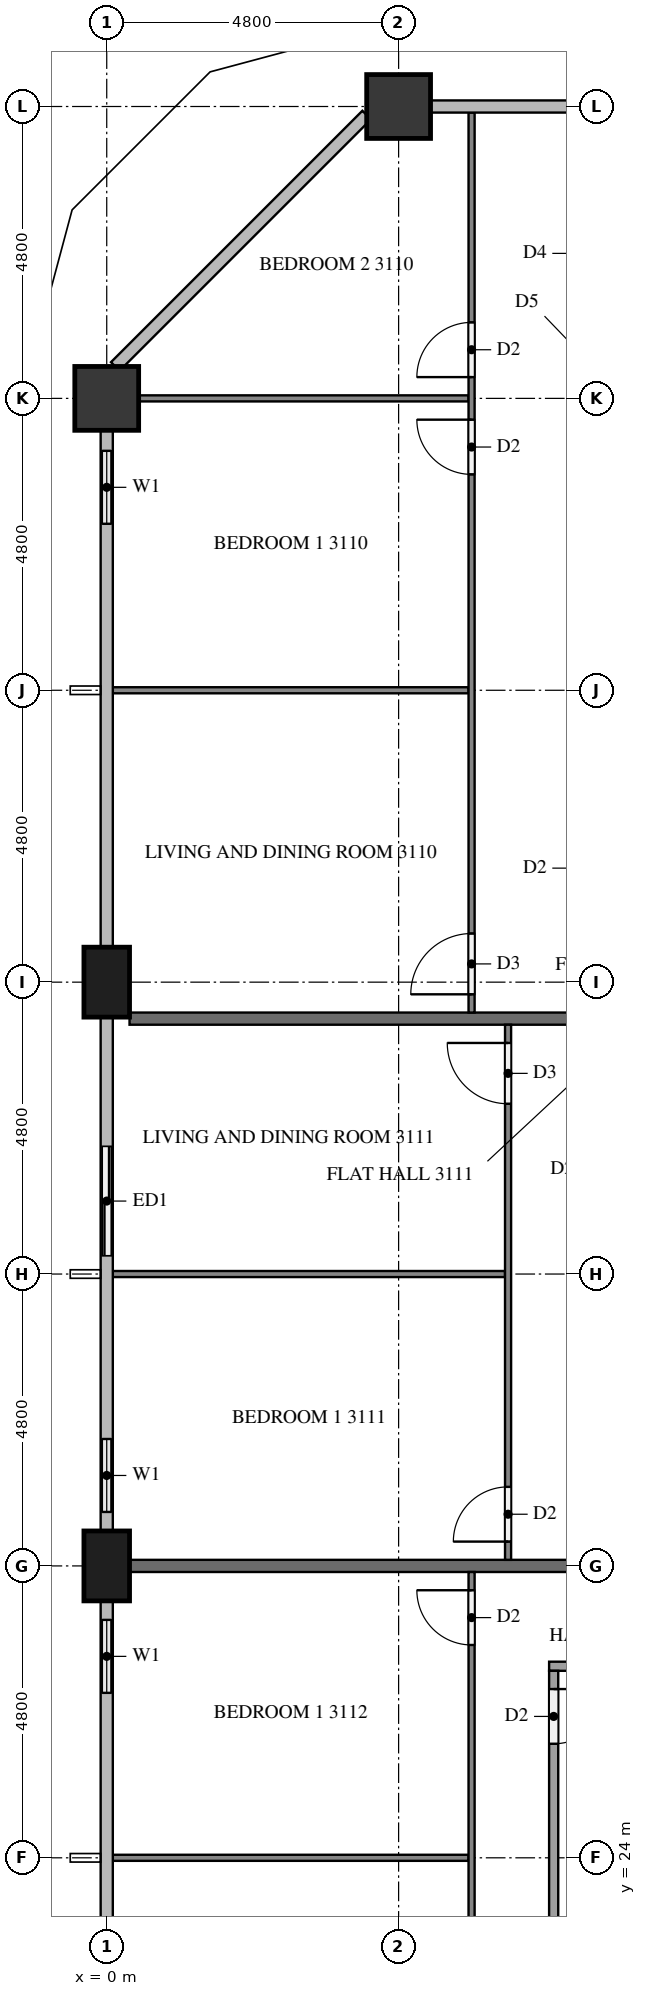
"""IFC4 building model, lengths in metres.
Left out: names, types, materials, properties, quantities, classifications, styles, units other than length and angle.
Written with IfcOpenShell. Run it as: python <this file> out.ifc"""

import sys

from ifc_helpers import new_model, si_unit, direction, frame, frame_2d, origin, origin_2d, place, context, subcontext, project, spatial, rectangle, extrude, element, fill, save


model = new_model("IFC4")
c1 = context("Model", 3, precision=1e-05, world=origin(), true_north=direction((0.0, 1.0)))
c2 = subcontext(c1, "Body", "Model", "MODEL_VIEW")
j1 = project(units=[si_unit("LENGTHUNIT", "METRE"), si_unit("PLANEANGLEUNIT", "RADIAN")], contexts=[c1])
p1 = place(None, origin())
s1 = spatial("IfcSite", under=j1, at=p1, CompositionType="ELEMENT")
p2 = place(p1, origin())
s2 = spatial("IfcBuilding", under=s1, at=p2, CompositionType="ELEMENT")
p3 = place(p2, frame((0.0, 0.0, 122.6)))
s3 = spatial("IfcBuildingStorey", under=s2, at=p3, CompositionType="ELEMENT", Elevation=122.6)
for number, where, z_axis, x_axis in (
    (1, (4.8, 52.8, 0.0), (0.0, 0.0, 1.0), (1.0, 0.0, 0.0)),
    (2, (0.0, 48.0, 0.0), (0.0, 0.0, 1.0), (1.0, 0.0, 0.0)),
):
    element("IfcColumn", number, at=place(p3, frame(where, z_axis=z_axis, x_axis=x_axis)), inside=s3, PredefinedType="COLUMN", context=c2, shape_type="SweptSolid", body=[
        extrude(rectangle(XDim=1.05, YDim=1.05, at=origin_2d()), origin(), (0.0, 0.0, 1.0), 3.2),
    ])
for number, where, z_axis, x_axis in (
    (3, (0.0, 38.4, 0.0), (0.0, 0.0, 1.0), (0.0, 1.0, 0.0)),
    (4, (0.0, 28.8, 0.0), (0.0, 0.0, 1.0), (0.0, 1.0, 0.0)),
):
    element("IfcColumn", number, at=place(p3, frame(where, z_axis=z_axis, x_axis=x_axis)), inside=s3, PredefinedType="COLUMN", context=c2, shape_type="SweptSolid", body=[
        extrude(rectangle(XDim=1.15, YDim=0.75, at=origin_2d()), origin(), (0.0, 0.0, 1.0), 3.2),
    ])
p4 = place(p3, frame((0.0, 47.475, 0.0), z_axis=(0.0, 0.0, 1.0), x_axis=(0.0, -1.0, 0.0)))
e5 = element("IfcWall", 5, at=p4, inside=s3, PredefinedType="SOLIDWALL", context=c2, shape_type="SweptSolid", body=[
    extrude(rectangle(XDim=1.875, YDim=0.15, at=frame_2d((0.938, 0.0))), origin(), (0.0, 0.0, 1.0), 3.2),
])
p5 = place(p4, frame((0.337, 0.0, 0.9)))
e6 = element("IfcOpeningElement", 6, at=p5, cuts=e5, PredefinedType="OPENING", context=c2, shape_type="SweptSolid", body=[
    extrude(rectangle(XDim=1.2, YDim=1.4, at=frame_2d((0.6, 0.7))), frame((0.0, 0.085, 0.0), z_axis=(0.0, -1.0, 0.0), x_axis=(1.0, 0.0, 0.0)), (0.0, 0.0, 1.0), 0.17),
])
p6 = place(p3, frame((0.0, 36.0, 0.0), z_axis=(0.0, 0.0, 1.0), x_axis=(0.0, -1.0, 0.0)))
e7 = element("IfcWall", 7, at=p6, inside=s3, PredefinedType="SOLIDWALL", context=c2, shape_type="SweptSolid", body=[
    extrude(rectangle(XDim=2.4, YDim=0.15, at=frame_2d((1.2, 0.0))), origin(), (0.0, 0.0, 1.0), 3.2),
])
p7 = place(p6, frame((0.3, 0.0, 0.0)))
e8 = element("IfcOpeningElement", 8, at=p7, cuts=e7, PredefinedType="OPENING", context=c2, shape_type="SweptSolid", body=[
    extrude(rectangle(XDim=1.8, YDim=2.4, at=frame_2d((0.9, 1.2))), frame((0.0, 0.085, 0.0), z_axis=(0.0, -1.0, 0.0), x_axis=(1.0, 0.0, 0.0)), (0.0, 0.0, 1.0), 0.17),
])
p8 = place(p3, frame((0.0, 31.2, 0.0), z_axis=(0.0, 0.0, 1.0), x_axis=(0.0, -1.0, 0.0)))
e9 = element("IfcWall", 9, at=p8, inside=s3, PredefinedType="SOLIDWALL", context=c2, shape_type="SweptSolid", body=[
    extrude(rectangle(XDim=1.825, YDim=0.15, at=frame_2d((0.913, 0.0))), origin(), (0.0, 0.0, 1.0), 3.2),
])
p9 = place(p8, frame((0.312, 0.0, 0.9)))
e10 = element("IfcOpeningElement", 10, at=p9, cuts=e9, PredefinedType="OPENING", context=c2, shape_type="SweptSolid", body=[
    extrude(rectangle(XDim=1.2, YDim=1.4, at=frame_2d((0.6, 0.7))), frame((0.0, 0.085, 0.0), z_axis=(0.0, -1.0, 0.0), x_axis=(1.0, 0.0, 0.0)), (0.0, 0.0, 1.0), 0.17),
])
p10 = place(p3, frame((0.0, 28.225, 0.0), z_axis=(0.0, 0.0, 1.0), x_axis=(0.0, -1.0, 0.0)))
e11 = element("IfcWall", 11, at=p10, inside=s3, PredefinedType="SOLIDWALL", context=c2, shape_type="SweptSolid", body=[
    extrude(rectangle(XDim=1.825, YDim=0.15, at=frame_2d((0.913, 0.0))), origin(), (0.0, 0.0, 1.0), 3.2),
])
p11 = place(p10, frame((0.312, 0.0, 0.9)))
e12 = element("IfcOpeningElement", 12, at=p11, cuts=e11, PredefinedType="OPENING", context=c2, shape_type="SweptSolid", body=[
    extrude(rectangle(XDim=1.2, YDim=1.4, at=frame_2d((0.6, 0.7))), frame((0.0, 0.085, 0.0), z_axis=(0.0, -1.0, 0.0), x_axis=(1.0, 0.0, 0.0)), (0.0, 0.0, 1.0), 0.17),
])
for number, where, z_axis, x_axis in (
    (13, (0.375, 37.8, 0.0), (0.0, 0.0, 1.0), (1.0, 0.0, 0.0)),
    (14, (0.375, 28.8, 0.0), (0.0, 0.0, 1.0), (1.0, 0.0, 0.0)),
):
    element("IfcWall", number, at=place(p3, frame(where, z_axis=z_axis, x_axis=x_axis)), inside=s3, PredefinedType="PARTITIONING", context=c2, shape_type="SweptSolid", body=[
        extrude(rectangle(XDim=9.525, YDim=0.2, at=frame_2d((4.762, 0.0))), origin(), (0.0, 0.0, 1.0), 3.2),
    ])
p12 = place(p3, frame((5.95, 43.2, 0.0), z_axis=(0.0, 0.0, 1.0), x_axis=(-1.0, 0.0, 0.0)))
e15 = element("IfcWall", 15, at=p12, inside=s3, PredefinedType="PARTITIONING", context=c2, shape_type="SweptSolid", body=[
    extrude(rectangle(XDim=5.85, YDim=0.1, at=frame_2d((2.925, 0.0))), origin(), (0.0, 0.0, 1.0), 3.2),
])
p13 = place(p3, frame((5.95, 48.0, 0.0), z_axis=(0.0, 0.0, 1.0), x_axis=(-1.0, 0.0, 0.0)))
e16 = element("IfcWall", 16, at=p13, inside=s3, PredefinedType="PARTITIONING", context=c2, shape_type="SweptSolid", body=[
    extrude(rectangle(XDim=5.425, YDim=0.1, at=frame_2d((2.712, 0.0))), origin(), (0.0, 0.0, 1.0), 3.2),
])
p14 = place(p3, frame((6.0, 37.9, 0.0), z_axis=(0.0, 0.0, 1.0), x_axis=(0.0, 1.0, 0.0)))
e17 = element("IfcWall", 17, at=p14, inside=s3, PredefinedType="PARTITIONING", context=c2, shape_type="SweptSolid", body=[
    extrude(rectangle(XDim=14.8, YDim=0.1, at=frame_2d((7.4, 0.0))), origin(), (0.0, 0.0, 1.0), 3.2),
])
p15 = place(p14, frame((0.3, 0.0, 0.0)))
e18 = element("IfcOpeningElement", 18, at=p15, cuts=e17, PredefinedType="OPENING", context=c2, shape_type="SweptSolid", body=[
    extrude(rectangle(XDim=1.0, YDim=2.1, at=frame_2d((0.5, 1.05))), frame((0.0, 0.06, 0.0), z_axis=(0.0, -1.0, 0.0), x_axis=(1.0, 0.0, 0.0)), (0.0, 0.0, 1.0), 0.12),
])
p16 = place(p14, frame((8.85, 0.0, 0.0)))
e19 = element("IfcOpeningElement", 19, at=p16, cuts=e17, PredefinedType="OPENING", context=c2, shape_type="SweptSolid", body=[
    extrude(rectangle(XDim=0.9, YDim=2.1, at=frame_2d((0.45, 1.05))), frame((0.0, 0.06, 0.0), z_axis=(0.0, -1.0, 0.0), x_axis=(1.0, 0.0, 0.0)), (0.0, 0.0, 1.0), 0.12),
])
p17 = place(p14, frame((10.45, 0.0, 0.0)))
e20 = element("IfcOpeningElement", 20, at=p17, cuts=e17, PredefinedType="OPENING", context=c2, shape_type="SweptSolid", body=[
    extrude(rectangle(XDim=0.9, YDim=2.1, at=frame_2d((0.45, 1.05))), frame((0.0, 0.06, 0.0), z_axis=(0.0, -1.0, 0.0), x_axis=(1.0, 0.0, 0.0)), (0.0, 0.0, 1.0), 0.12),
])
p18 = place(p3, frame((6.55, 33.6, 0.0), z_axis=(0.0, 0.0, 1.0), x_axis=(-1.0, 0.0, 0.0)))
e21 = element("IfcWall", 21, at=p18, inside=s3, PredefinedType="PARTITIONING", context=c2, shape_type="SweptSolid", body=[
    extrude(rectangle(XDim=6.45, YDim=0.1, at=frame_2d((3.225, 0.0))), origin(), (0.0, 0.0, 1.0), 3.2),
])
p19 = place(p3, frame((6.6, 28.9, 0.0), z_axis=(0.0, 0.0, 1.0), x_axis=(0.0, 1.0, 0.0)))
e22 = element("IfcWall", 22, at=p19, inside=s3, PredefinedType="PARTITIONING", context=c2, shape_type="SweptSolid", body=[
    extrude(rectangle(XDim=8.8, YDim=0.1, at=frame_2d((4.4, 0.0))), origin(), (0.0, 0.0, 1.0), 3.2),
])
p20 = place(p19, frame((7.5, 0.0, 0.0)))
e23 = element("IfcOpeningElement", 23, at=p20, cuts=e22, PredefinedType="OPENING", context=c2, shape_type="SweptSolid", body=[
    extrude(rectangle(XDim=1.0, YDim=2.1, at=frame_2d((0.5, 1.05))), frame((0.0, 0.06, 0.0), z_axis=(0.0, -1.0, 0.0), x_axis=(1.0, 0.0, 0.0)), (0.0, 0.0, 1.0), 0.12),
])
p21 = place(p19, frame((0.3, 0.0, 0.0)))
e24 = element("IfcOpeningElement", 24, at=p21, cuts=e22, PredefinedType="OPENING", context=c2, shape_type="SweptSolid", body=[
    extrude(rectangle(XDim=0.9, YDim=2.1, at=frame_2d((0.45, 1.05))), frame((0.0, 0.06, 0.0), z_axis=(0.0, -1.0, 0.0), x_axis=(1.0, 0.0, 0.0)), (0.0, 0.0, 1.0), 0.12),
])
p22 = place(p3, frame((5.95, 24.0, 0.0), z_axis=(0.0, 0.0, 1.0), x_axis=(-1.0, 0.0, 0.0)))
e25 = element("IfcWall", 25, at=p22, inside=s3, PredefinedType="PARTITIONING", context=c2, shape_type="SweptSolid", body=[
    extrude(rectangle(XDim=5.85, YDim=0.1, at=frame_2d((2.925, 0.0))), origin(), (0.0, 0.0, 1.0), 3.2),
])
p23 = place(p3, frame((6.0, 15.1, 0.0), z_axis=(0.0, 0.0, 1.0), x_axis=(0.0, 1.0, 0.0)))
e26 = element("IfcWall", 26, at=p23, inside=s3, PredefinedType="PARTITIONING", context=c2, shape_type="SweptSolid", body=[
    extrude(rectangle(XDim=13.6, YDim=0.1, at=frame_2d((6.8, 0.0))), origin(), (0.0, 0.0, 1.0), 3.2),
])
p24 = place(p23, frame((12.4, 0.0, 0.0)))
e27 = element("IfcOpeningElement", 27, at=p24, cuts=e26, PredefinedType="OPENING", context=c2, shape_type="SweptSolid", body=[
    extrude(rectangle(XDim=0.9, YDim=2.1, at=frame_2d((0.45, 1.05))), frame((0.0, 0.06, 0.0), z_axis=(0.0, -1.0, 0.0), x_axis=(1.0, 0.0, 0.0)), (0.0, 0.0, 1.0), 0.12),
])
p25 = place(p23, frame((4.45, 0.0, 0.0)))
e28 = element("IfcOpeningElement", 28, at=p25, cuts=e26, PredefinedType="OPENING", context=c2, shape_type="SweptSolid", body=[
    extrude(rectangle(XDim=0.9, YDim=2.1, at=frame_2d((0.45, 1.05))), frame((0.0, 0.06, 0.0), z_axis=(0.0, -1.0, 0.0), x_axis=(1.0, 0.0, 0.0)), (0.0, 0.0, 1.0), 0.12),
])
p26 = place(p23, frame((2.75, 0.0, 0.0)))
e29 = element("IfcOpeningElement", 29, at=p26, cuts=e26, PredefinedType="OPENING", context=c2, shape_type="SweptSolid", body=[
    extrude(rectangle(XDim=1.0, YDim=2.1, at=frame_2d((0.5, 1.05))), frame((0.0, 0.06, 0.0), z_axis=(0.0, -1.0, 0.0), x_axis=(1.0, 0.0, 0.0)), (0.0, 0.0, 1.0), 0.12),
])
p27 = place(p3, frame((9.9, 27.15, 0.0), z_axis=(0.0, 0.0, 1.0), x_axis=(-1.0, 0.0, 0.0)))
e30 = element("IfcWall", 30, at=p27, inside=s3, PredefinedType="PARTITIONING", context=c2, shape_type="SweptSolid", body=[
    extrude(rectangle(XDim=2.625, YDim=0.15, at=frame_2d((1.312, 0.0))), origin(), (0.0, 0.0, 1.0), 3.2),
])
p28 = place(p3, frame((7.35, 27.075, 0.0), z_axis=(0.0, 0.0, 1.0), x_axis=(0.0, -1.0, 0.0)))
e31 = element("IfcWall", 31, at=p28, inside=s3, PredefinedType="PARTITIONING", context=c2, shape_type="SweptSolid", body=[
    extrude(rectangle(XDim=11.975, YDim=0.15, at=frame_2d((5.987, 0.0))), origin(), (0.0, 0.0, 1.0), 3.2),
])
p29 = place(p28, frame((0.3, 0.0, 0.0)))
e32 = element("IfcOpeningElement", 32, at=p29, cuts=e31, PredefinedType="OPENING", context=c2, shape_type="SweptSolid", body=[
    extrude(rectangle(XDim=0.9, YDim=2.1, at=frame_2d((0.45, 1.05))), frame((0.0, 0.085, 0.0), z_axis=(0.0, -1.0, 0.0), x_axis=(1.0, 0.0, 0.0)), (0.0, 0.0, 1.0), 0.17),
])
p30 = place(p28, frame((7.165, 0.0, 0.0)))
e33 = element("IfcOpeningElement", 33, at=p30, cuts=e31, PredefinedType="OPENING", context=c2, shape_type="SweptSolid", body=[
    extrude(rectangle(XDim=0.8, YDim=2.1, at=frame_2d((0.4, 1.05))), frame((0.0, 0.085, 0.0), z_axis=(0.0, -1.0, 0.0), x_axis=(1.0, 0.0, 0.0)), (0.0, 0.0, 1.0), 0.17),
])
p31 = place(p28, frame((8.615, 0.0, 0.0)))
e34 = element("IfcOpeningElement", 34, at=p31, cuts=e31, PredefinedType="OPENING", context=c2, shape_type="SweptSolid", body=[
    extrude(rectangle(XDim=0.8, YDim=2.1, at=frame_2d((0.4, 1.05))), frame((0.0, 0.085, 0.0), z_axis=(0.0, -1.0, 0.0), x_axis=(1.0, 0.0, 0.0)), (0.0, 0.0, 1.0), 0.17),
])
p32 = place(p5, origin())
e35 = element("IfcWindow", 35, at=p32, inside=s3, PartitioningType="SINGLE_PANEL", PredefinedType="WINDOW", context=c2, shape_type="SweptSolid", body=[
    extrude(rectangle(XDim=1.2, YDim=1.4, at=frame_2d((0.6, 0.7))), frame((0.0, 0.03, 0.0), z_axis=(0.0, -1.0, 0.0), x_axis=(1.0, 0.0, 0.0)), (0.0, 0.0, 1.0), 0.06),
])
fill(e6, e35)
p33 = place(p7, origin())
e36 = element("IfcDoor", 36, at=p33, inside=s3, OperationType="SLIDING_TO_LEFT", PredefinedType="DOOR", context=c2, shape_type="SweptSolid", body=[
    extrude(rectangle(XDim=1.8, YDim=2.4, at=frame_2d((0.9, 1.2))), frame((0.0, 0.025, 0.0), z_axis=(0.0, -1.0, 0.0), x_axis=(1.0, 0.0, 0.0)), (0.0, 0.0, 1.0), 0.05),
])
fill(e8, e36)
p34 = place(p9, origin())
e37 = element("IfcWindow", 37, at=p34, inside=s3, PartitioningType="SINGLE_PANEL", PredefinedType="WINDOW", context=c2, shape_type="SweptSolid", body=[
    extrude(rectangle(XDim=1.2, YDim=1.4, at=frame_2d((0.6, 0.7))), frame((0.0, 0.03, 0.0), z_axis=(0.0, -1.0, 0.0), x_axis=(1.0, 0.0, 0.0)), (0.0, 0.0, 1.0), 0.06),
])
fill(e10, e37)
p35 = place(p11, origin())
e38 = element("IfcWindow", 38, at=p35, inside=s3, PartitioningType="SINGLE_PANEL", PredefinedType="WINDOW", context=c2, shape_type="SweptSolid", body=[
    extrude(rectangle(XDim=1.2, YDim=1.4, at=frame_2d((0.6, 0.7))), frame((0.0, 0.03, 0.0), z_axis=(0.0, -1.0, 0.0), x_axis=(1.0, 0.0, 0.0)), (0.0, 0.0, 1.0), 0.06),
])
fill(e12, e38)
p36 = place(p15, origin())
e39 = element("IfcDoor", 39, at=p36, inside=s3, OperationType="SINGLE_SWING_LEFT", PredefinedType="DOOR", context=c2, shape_type="SweptSolid", body=[
    extrude(rectangle(XDim=1.0, YDim=2.1, at=frame_2d((0.5, 1.05))), frame((0.0, 0.025, 0.0), z_axis=(0.0, -1.0, 0.0), x_axis=(1.0, 0.0, 0.0)), (0.0, 0.0, 1.0), 0.05),
])
fill(e18, e39)
p37 = place(p16, origin())
e40 = element("IfcDoor", 40, at=p37, inside=s3, OperationType="SINGLE_SWING_RIGHT", PredefinedType="DOOR", context=c2, shape_type="SweptSolid", body=[
    extrude(rectangle(XDim=0.9, YDim=2.1, at=frame_2d((0.45, 1.05))), frame((0.0, 0.025, 0.0), z_axis=(0.0, -1.0, 0.0), x_axis=(1.0, 0.0, 0.0)), (0.0, 0.0, 1.0), 0.05),
])
fill(e19, e40)
p38 = place(p17, origin())
e41 = element("IfcDoor", 41, at=p38, inside=s3, OperationType="SINGLE_SWING_LEFT", PredefinedType="DOOR", context=c2, shape_type="SweptSolid", body=[
    extrude(rectangle(XDim=0.9, YDim=2.1, at=frame_2d((0.45, 1.05))), frame((0.0, 0.025, 0.0), z_axis=(0.0, -1.0, 0.0), x_axis=(1.0, 0.0, 0.0)), (0.0, 0.0, 1.0), 0.05),
])
fill(e20, e41)
p39 = place(p20, origin())
e42 = element("IfcDoor", 42, at=p39, inside=s3, OperationType="SINGLE_SWING_RIGHT", PredefinedType="DOOR", context=c2, shape_type="SweptSolid", body=[
    extrude(rectangle(XDim=1.0, YDim=2.1, at=frame_2d((0.5, 1.05))), frame((0.0, 0.025, 0.0), z_axis=(0.0, -1.0, 0.0), x_axis=(1.0, 0.0, 0.0)), (0.0, 0.0, 1.0), 0.05),
])
fill(e23, e42)
p40 = place(p21, origin())
e43 = element("IfcDoor", 43, at=p40, inside=s3, OperationType="SINGLE_SWING_LEFT", PredefinedType="DOOR", context=c2, shape_type="SweptSolid", body=[
    extrude(rectangle(XDim=0.9, YDim=2.1, at=frame_2d((0.45, 1.05))), frame((0.0, 0.025, 0.0), z_axis=(0.0, -1.0, 0.0), x_axis=(1.0, 0.0, 0.0)), (0.0, 0.0, 1.0), 0.05),
])
fill(e24, e43)
p41 = place(p24, origin())
e44 = element("IfcDoor", 44, at=p41, inside=s3, OperationType="SINGLE_SWING_RIGHT", PredefinedType="DOOR", context=c2, shape_type="SweptSolid", body=[
    extrude(rectangle(XDim=0.9, YDim=2.1, at=frame_2d((0.45, 1.05))), frame((0.0, 0.025, 0.0), z_axis=(0.0, -1.0, 0.0), x_axis=(1.0, 0.0, 0.0)), (0.0, 0.0, 1.0), 0.05),
])
fill(e27, e44)
p42 = place(p29, origin())
e45 = element("IfcDoor", 45, at=p42, inside=s3, OperationType="SINGLE_SWING_LEFT", PredefinedType="DOOR", context=c2, shape_type="SweptSolid", body=[
    extrude(rectangle(XDim=0.9, YDim=2.1, at=frame_2d((0.45, 1.05))), frame((0.0, 0.025, 0.0), z_axis=(0.0, -1.0, 0.0), x_axis=(1.0, 0.0, 0.0)), (0.0, 0.0, 1.0), 0.05),
])
fill(e32, e45)
save(model, sys.argv[1])
